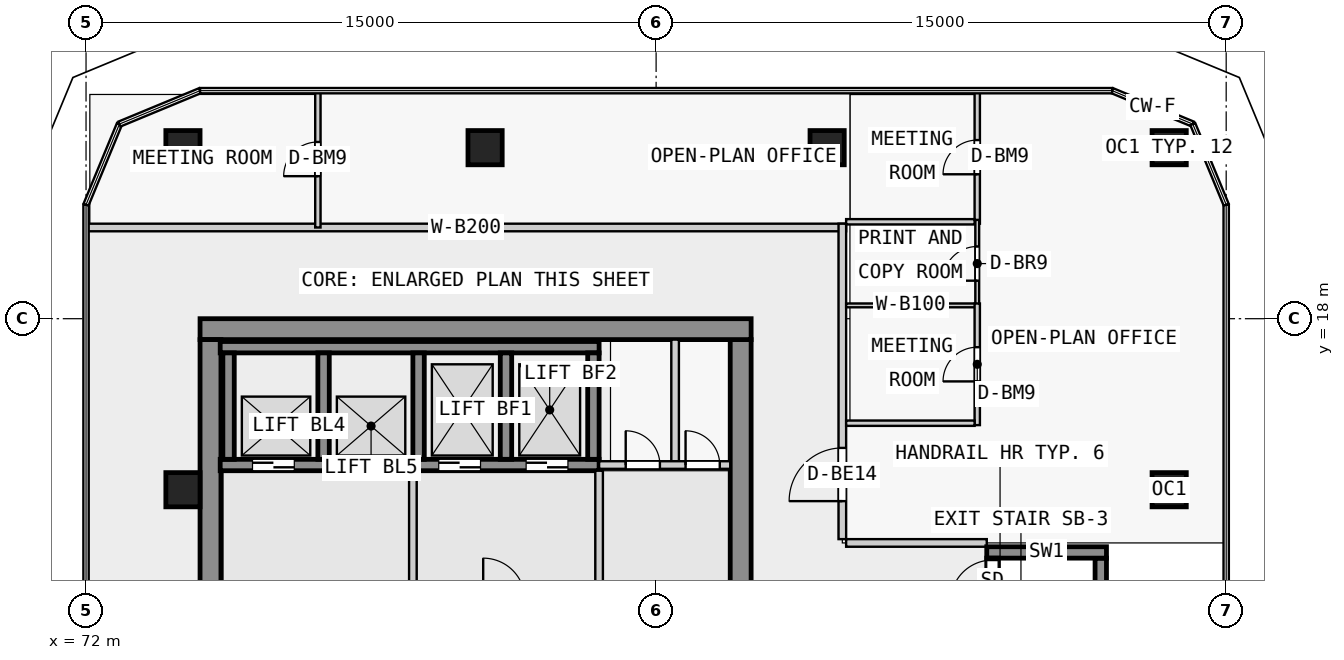
"""IFC4 building model, lengths in metres.
Left out: names, types, materials, properties, quantities, classifications, styles, units other than length and angle.
Written with IfcOpenShell. Run it as: python <this file> out.ifc"""

import sys

from ifc_helpers import new_model, si_unit, direction, frame, frame_2d, origin, origin_2d, place, context, subcontext, project, spatial, rectangle, extrude, element, fill, save


model = new_model("IFC4")
c1 = context("Model", 3, precision=1e-05, world=origin(), true_north=direction((0.0, 1.0)))
c2 = subcontext(c1, "Body", "Model", "MODEL_VIEW")
j1 = project(units=[si_unit("LENGTHUNIT", "METRE"), si_unit("PLANEANGLEUNIT", "RADIAN")], contexts=[c1])
p1 = place(None, origin())
s1 = spatial("IfcSite", under=j1, at=p1, CompositionType="ELEMENT")
p2 = place(p1, origin())
s2 = spatial("IfcBuilding", under=s1, at=p2, CompositionType="ELEMENT")
p3 = place(p2, frame((0.0, 0.0, 30.3)))
s3 = spatial("IfcBuildingStorey", under=s2, at=p3, CompositionType="ELEMENT", Elevation=30.3)
for number, where, z_axis, x_axis in (
    (1, (100.5, 13.5, 0.0), (0.0, 0.0, 1.0), (1.0, 0.0, 0.0)),
    (2, (100.5, 22.5, 0.0), (0.0, 0.0, 1.0), (1.0, 0.0, 0.0)),
    (3, (91.5, 22.5, 0.0), (0.0, 0.0, 1.0), (1.0, 0.0, 0.0)),
    (4, (82.5, 22.5, 0.0), (0.0, 0.0, 1.0), (1.0, 0.0, 0.0)),
    (5, (74.55, 22.5, 0.0), (0.0, 0.0, 1.0), (1.0, 0.0, 0.0)),
    (6, (74.55, 13.5, 0.0), (0.0, 0.0, 1.0), (1.0, 0.0, 0.0)),
):
    element("IfcColumn", number, at=place(p3, frame(where, z_axis=z_axis, x_axis=x_axis)), inside=s3, PredefinedType="COLUMN", context=c2, shape_type="SweptSolid", body=[
        extrude(rectangle(XDim=0.9, YDim=0.9, at=origin_2d()), origin(), (0.0, 0.0, 1.0), 3.5),
    ])
p4 = place(p3, frame((75.0, 17.725, 0.0), z_axis=(0.0, 0.0, 1.0), x_axis=(1.0, 0.0, 0.0)))
e7 = element("IfcWall", 7, at=p4, inside=s3, PredefinedType="SHEAR", context=c2, shape_type="SweptSolid", body=[
    extrude(rectangle(XDim=14.5, YDim=0.55, at=frame_2d((7.25, 0.0))), origin(), (0.0, 0.0, 1.0), 3.25),
])
p5 = place(p3, frame((75.275, 0.55, 0.0), z_axis=(0.0, 0.0, 1.0), x_axis=(0.0, 1.0, 0.0)))
e8 = element("IfcWall", 8, at=p5, inside=s3, PredefinedType="SHEAR", context=c2, shape_type="SweptSolid", body=[
    extrude(rectangle(XDim=16.9, YDim=0.55, at=frame_2d((8.45, 0.0))), origin(), (0.0, 0.0, 1.0), 3.25),
])
p6 = place(p5, frame((7.825, 0.0, 0.0)))
e9 = element("IfcOpeningElement", 9, at=p6, cuts=e8, PredefinedType="OPENING", context=c2, shape_type="SweptSolid", body=[
    extrude(rectangle(XDim=1.8, YDim=2.1, at=frame_2d((0.9, 1.05))), frame((0.0, 0.285, 0.0), z_axis=(0.0, -1.0, 0.0), x_axis=(1.0, 0.0, 0.0)), (0.0, 0.0, 1.0), 0.57),
])
p7 = place(p3, frame((89.225, 0.55, 0.0), z_axis=(0.0, 0.0, 1.0), x_axis=(0.0, 1.0, 0.0)))
e10 = element("IfcWall", 10, at=p7, inside=s3, PredefinedType="SHEAR", context=c2, shape_type="SweptSolid", body=[
    extrude(rectangle(XDim=16.9, YDim=0.55, at=frame_2d((8.45, 0.0))), origin(), (0.0, 0.0, 1.0), 3.25),
])
p8 = place(p7, frame((7.55, 0.0, 0.0)))
e11 = element("IfcOpeningElement", 11, at=p8, cuts=e10, PredefinedType="OPENING", context=c2, shape_type="SweptSolid", body=[
    extrude(rectangle(XDim=1.8, YDim=2.1, at=frame_2d((0.9, 1.05))), frame((0.0, 0.285, 0.0), z_axis=(0.0, -1.0, 0.0), x_axis=(1.0, 0.0, 0.0)), (0.0, 0.0, 1.0), 0.57),
])
p9 = place(p3, frame((75.53, 17.25, 0.0), z_axis=(0.0, 0.0, 1.0), x_axis=(1.0, 0.0, 0.0)))
e12 = element("IfcWall", 12, at=p9, inside=s3, PredefinedType="SHEAR", context=c2, shape_type="SweptSolid", body=[
    extrude(rectangle(XDim=9.97, YDim=0.3, at=frame_2d((4.985, 0.0))), origin(), (0.0, 0.0, 1.0), 3.25),
])
p10 = place(p3, frame((75.53, 14.15, 0.0), z_axis=(0.0, 0.0, 1.0), x_axis=(1.0, 0.0, 0.0)))
e13 = element("IfcWall", 13, at=p10, inside=s3, PredefinedType="SHEAR", context=c2, shape_type="SweptSolid", body=[
    extrude(rectangle(XDim=9.97, YDim=0.3, at=frame_2d((4.985, 0.0))), origin(), (0.0, 0.0, 1.0), 3.25),
])
p11 = place(p10, frame((0.85, 0.0, 0.0)))
e14 = element("IfcOpeningElement", 14, at=p11, cuts=e13, PredefinedType="OPENING", context=c2, shape_type="SweptSolid", body=[
    extrude(rectangle(XDim=1.1, YDim=2.1, at=frame_2d((0.55, 1.05))), frame((0.0, 0.16, 0.0), z_axis=(0.0, -1.0, 0.0), x_axis=(1.0, 0.0, 0.0)), (0.0, 0.0, 1.0), 0.32),
])
p12 = place(p10, frame((3.35, 0.0, 0.0)))
e15 = element("IfcOpeningElement", 15, at=p12, cuts=e13, PredefinedType="OPENING", context=c2, shape_type="SweptSolid", body=[
    extrude(rectangle(XDim=1.1, YDim=2.1, at=frame_2d((0.55, 1.05))), frame((0.0, 0.16, 0.0), z_axis=(0.0, -1.0, 0.0), x_axis=(1.0, 0.0, 0.0)), (0.0, 0.0, 1.0), 0.32),
])
p13 = place(p10, frame((5.75, 0.0, 0.0)))
e16 = element("IfcOpeningElement", 16, at=p13, cuts=e13, PredefinedType="OPENING", context=c2, shape_type="SweptSolid", body=[
    extrude(rectangle(XDim=1.1, YDim=2.1, at=frame_2d((0.55, 1.05))), frame((0.0, 0.16, 0.0), z_axis=(0.0, -1.0, 0.0), x_axis=(1.0, 0.0, 0.0)), (0.0, 0.0, 1.0), 0.32),
])
p14 = place(p10, frame((8.05, 0.0, 0.0)))
e17 = element("IfcOpeningElement", 17, at=p14, cuts=e13, PredefinedType="OPENING", context=c2, shape_type="SweptSolid", body=[
    extrude(rectangle(XDim=1.1, YDim=2.1, at=frame_2d((0.55, 1.05))), frame((0.0, 0.16, 0.0), z_axis=(0.0, -1.0, 0.0), x_axis=(1.0, 0.0, 0.0)), (0.0, 0.0, 1.0), 0.32),
])
for number, where, z_axis, x_axis in (
    (18, (75.75, 14.3, 0.0), (0.0, 0.0, 1.0), (0.0, 1.0, 0.0)),
    (19, (78.25, 14.3, 0.0), (0.0, 0.0, 1.0), (0.0, 1.0, 0.0)),
    (20, (80.75, 14.3, 0.0), (0.0, 0.0, 1.0), (0.0, 1.0, 0.0)),
    (21, (83.05, 14.3, 0.0), (0.0, 0.0, 1.0), (0.0, 1.0, 0.0)),
    (22, (85.35, 14.3, 0.0), (0.0, 0.0, 1.0), (0.0, 1.0, 0.0)),
):
    element("IfcWall", number, at=place(p3, frame(where, z_axis=z_axis, x_axis=x_axis)), inside=s3, PredefinedType="SHEAR", context=c2, shape_type="SweptSolid", body=[
        extrude(rectangle(XDim=2.8, YDim=0.3, at=frame_2d((1.4, 0.0))), origin(), (0.0, 0.0, 1.0), 3.25),
    ])
p15 = place(p3, frame((95.85, 5.3, 0.0), z_axis=(0.0, 0.0, 1.0), x_axis=(0.0, 1.0, 0.0)))
e23 = element("IfcWall", 23, at=p15, inside=s3, PredefinedType="SHEAR", context=c2, shape_type="SweptSolid", body=[
    extrude(rectangle(XDim=6.4, YDim=0.3, at=frame_2d((3.2, 0.0))), origin(), (0.0, 0.0, 1.0), 3.25),
])
p16 = place(p15, frame((5.25, 0.0, 0.0)))
e24 = element("IfcOpeningElement", 24, at=p16, cuts=e23, PredefinedType="OPENING", context=c2, shape_type="SweptSolid", body=[
    extrude(rectangle(XDim=1.1, YDim=2.1, at=frame_2d((0.55, 1.05))), frame((0.0, 0.16, 0.0), z_axis=(0.0, -1.0, 0.0), x_axis=(1.0, 0.0, 0.0)), (0.0, 0.0, 1.0), 0.32),
])
p17 = place(p3, frame((98.7, 5.3, 0.0), z_axis=(0.0, 0.0, 1.0), x_axis=(0.0, 1.0, 0.0)))
e25 = element("IfcWall", 25, at=p17, inside=s3, PredefinedType="SHEAR", context=c2, shape_type="SweptSolid", body=[
    extrude(rectangle(XDim=6.4, YDim=0.3, at=frame_2d((3.2, 0.0))), origin(), (0.0, 0.0, 1.0), 3.25),
])
p18 = place(p3, frame((95.7, 11.85, 0.0), z_axis=(0.0, 0.0, 1.0), x_axis=(1.0, 0.0, 0.0)))
e26 = element("IfcWall", 26, at=p18, inside=s3, PredefinedType="SHEAR", context=c2, shape_type="SweptSolid", body=[
    extrude(rectangle(XDim=3.15, YDim=0.3, at=frame_2d((1.575, 0.0))), origin(), (0.0, 0.0, 1.0), 3.25),
])
for number, where, z_axis, x_axis in (
    (27, (80.6, 10.6, 0.0), (0.0, 0.0, 1.0), (0.0, 1.0, 0.0)),
    (28, (85.5, 10.6, 0.0), (0.0, 0.0, 1.0), (0.0, 1.0, 0.0)),
):
    element("IfcWall", number, at=place(p3, frame(where, z_axis=z_axis, x_axis=x_axis)), inside=s3, PredefinedType="PARTITIONING", context=c2, shape_type="SweptSolid", body=[
        extrude(rectangle(XDim=3.4, YDim=0.2, at=frame_2d((1.7, 0.0))), origin(), (0.0, 0.0, 1.0), 3.25),
    ])
p19 = place(p3, frame((85.5, 14.15, 0.0), z_axis=(0.0, 0.0, 1.0), x_axis=(1.0, 0.0, 0.0)))
e29 = element("IfcWall", 29, at=p19, inside=s3, PredefinedType="PARTITIONING", context=c2, shape_type="SweptSolid", body=[
    extrude(rectangle(XDim=3.45, YDim=0.2, at=frame_2d((1.725, 0.0))), origin(), (0.0, 0.0, 1.0), 3.25),
])
p20 = place(p19, frame((0.7, 0.0, 0.0)))
e30 = element("IfcOpeningElement", 30, at=p20, cuts=e29, PredefinedType="OPENING", context=c2, shape_type="SweptSolid", body=[
    extrude(rectangle(XDim=0.9, YDim=2.1, at=frame_2d((0.45, 1.05))), frame((0.0, 0.11, 0.0), z_axis=(0.0, -1.0, 0.0), x_axis=(1.0, 0.0, 0.0)), (0.0, 0.0, 1.0), 0.22),
])
p21 = place(p19, frame((2.275, 0.0, 0.0)))
e31 = element("IfcOpeningElement", 31, at=p21, cuts=e29, PredefinedType="OPENING", context=c2, shape_type="SweptSolid", body=[
    extrude(rectangle(XDim=0.9, YDim=2.1, at=frame_2d((0.45, 1.05))), frame((0.0, 0.11, 0.0), z_axis=(0.0, -1.0, 0.0), x_axis=(1.0, 0.0, 0.0)), (0.0, 0.0, 1.0), 0.22),
])
p22 = place(p3, frame((87.5, 14.25, 0.0), z_axis=(0.0, 0.0, 1.0), x_axis=(0.0, 1.0, 0.0)))
e32 = element("IfcWall", 32, at=p22, inside=s3, PredefinedType="PARTITIONING", context=c2, shape_type="SweptSolid", body=[
    extrude(rectangle(XDim=3.2, YDim=0.2, at=frame_2d((1.6, 0.0))), origin(), (0.0, 0.0, 1.0), 3.25),
])
p23 = place(p3, frame((72.0, 20.4, 0.0), z_axis=(0.0, 0.0, 1.0), x_axis=(1.0, 0.0, 0.0)))
e33 = element("IfcWall", 33, at=p23, inside=s3, PredefinedType="PARTITIONING", context=c2, shape_type="SweptSolid", body=[
    extrude(rectangle(XDim=20.0, YDim=0.2, at=frame_2d((10.0, 0.0))), origin(), (0.0, 0.0, 1.0), 3.25),
])
p24 = place(p3, frame((91.9, 12.2, 0.0), z_axis=(0.0, 0.0, 1.0), x_axis=(0.0, 1.0, 0.0)))
e34 = element("IfcWall", 34, at=p24, inside=s3, PredefinedType="PARTITIONING", context=c2, shape_type="SweptSolid", body=[
    extrude(rectangle(XDim=8.3, YDim=0.2, at=frame_2d((4.15, 0.0))), origin(), (0.0, 0.0, 1.0), 3.25),
])
p25 = place(p24, frame((1.0, 0.0, 0.0)))
e35 = element("IfcOpeningElement", 35, at=p25, cuts=e34, PredefinedType="OPENING", context=c2, shape_type="SweptSolid", body=[
    extrude(rectangle(XDim=1.4, YDim=2.4, at=frame_2d((0.7, 1.2))), frame((0.0, 0.11, 0.0), z_axis=(0.0, -1.0, 0.0), x_axis=(1.0, 0.0, 0.0)), (0.0, 0.0, 1.0), 0.22),
])
p26 = place(p3, frame((92.0, 12.1, 0.0), z_axis=(0.0, 0.0, 1.0), x_axis=(1.0, 0.0, 0.0)))
e36 = element("IfcWall", 36, at=p26, inside=s3, PredefinedType="PARTITIONING", context=c2, shape_type="SweptSolid", body=[
    extrude(rectangle(XDim=3.7, YDim=0.2, at=frame_2d((1.85, 0.0))), origin(), (0.0, 0.0, 1.0), 3.25),
])
p27 = place(p3, frame((95.45, 20.5, 0.0), z_axis=(0.0, 0.0, 1.0), x_axis=(0.0, 1.0, 0.0)))
e37 = element("IfcWall", 37, at=p27, inside=s3, PredefinedType="PARTITIONING", context=c2, shape_type="SweptSolid", body=[
    extrude(rectangle(XDim=3.5, YDim=0.14, at=frame_2d((1.75, 0.0))), origin(), (0.0, 0.0, 1.0), 3.25),
])
p28 = place(p27, frame((1.3, 0.0, 0.0)))
e38 = element("IfcOpeningElement", 38, at=p28, cuts=e37, PredefinedType="OPENING", context=c2, shape_type="SweptSolid", body=[
    extrude(rectangle(XDim=0.9, YDim=2.4, at=frame_2d((0.45, 1.2))), frame((0.0, 0.08, 0.0), z_axis=(0.0, -1.0, 0.0), x_axis=(1.0, 0.0, 0.0)), (0.0, 0.0, 1.0), 0.16),
])
p29 = place(p3, frame((92.0, 20.55, 0.0), z_axis=(0.0, 0.0, 1.0), x_axis=(1.0, 0.0, 0.0)))
e39 = element("IfcWall", 39, at=p29, inside=s3, PredefinedType="PARTITIONING", context=c2, shape_type="SweptSolid", body=[
    extrude(rectangle(XDim=3.38, YDim=0.14, at=frame_2d((1.69, 0.0))), origin(), (0.0, 0.0, 1.0), 3.25),
])
p30 = place(p3, frame((95.45, 18.3, 0.0), z_axis=(0.0, 0.0, 1.0), x_axis=(0.0, 1.0, 0.0)))
e40 = element("IfcWall", 40, at=p30, inside=s3, PredefinedType="PARTITIONING", context=c2, shape_type="SweptSolid", body=[
    extrude(rectangle(XDim=2.3, YDim=0.1, at=frame_2d((1.15, 0.0))), origin(), (0.0, 0.0, 1.0), 3.25),
])
p31 = place(p30, frame((0.7, 0.0, 0.0)))
e41 = element("IfcOpeningElement", 41, at=p31, cuts=e40, PredefinedType="OPENING", context=c2, shape_type="SweptSolid", body=[
    extrude(rectangle(XDim=0.9, YDim=2.1, at=frame_2d((0.45, 1.05))), frame((0.0, 0.06, 0.0), z_axis=(0.0, -1.0, 0.0), x_axis=(1.0, 0.0, 0.0)), (0.0, 0.0, 1.0), 0.12),
])
p32 = place(p3, frame((92.0, 18.35, 0.0), z_axis=(0.0, 0.0, 1.0), x_axis=(1.0, 0.0, 0.0)))
e42 = element("IfcWall", 42, at=p32, inside=s3, PredefinedType="PARTITIONING", context=c2, shape_type="SweptSolid", body=[
    extrude(rectangle(XDim=3.4, YDim=0.1, at=frame_2d((1.7, 0.0))), origin(), (0.0, 0.0, 1.0), 3.25),
])
p33 = place(p3, frame((95.45, 15.2, 0.0), z_axis=(0.0, 0.0, 1.0), x_axis=(0.0, 1.0, 0.0)))
e43 = element("IfcWall", 43, at=p33, inside=s3, PredefinedType="PARTITIONING", context=c2, shape_type="SweptSolid", body=[
    extrude(rectangle(XDim=3.2, YDim=0.14, at=frame_2d((1.6, 0.0))), origin(), (0.0, 0.0, 1.0), 3.25),
])
p34 = place(p33, frame((1.15, 0.0, 0.0)))
e44 = element("IfcOpeningElement", 44, at=p34, cuts=e43, PredefinedType="OPENING", context=c2, shape_type="SweptSolid", body=[
    extrude(rectangle(XDim=0.9, YDim=2.4, at=frame_2d((0.45, 1.2))), frame((0.0, 0.08, 0.0), z_axis=(0.0, -1.0, 0.0), x_axis=(1.0, 0.0, 0.0)), (0.0, 0.0, 1.0), 0.16),
])
p35 = place(p3, frame((92.0, 15.25, 0.0), z_axis=(0.0, 0.0, 1.0), x_axis=(1.0, 0.0, 0.0)))
e45 = element("IfcWall", 45, at=p35, inside=s3, PredefinedType="PARTITIONING", context=c2, shape_type="SweptSolid", body=[
    extrude(rectangle(XDim=3.38, YDim=0.14, at=frame_2d((1.69, 0.0))), origin(), (0.0, 0.0, 1.0), 3.25),
])
p36 = place(p3, frame((78.1, 20.4, 0.0), z_axis=(0.0, 0.0, 1.0), x_axis=(0.0, 1.0, 0.0)))
e46 = element("IfcWall", 46, at=p36, inside=s3, PredefinedType="PARTITIONING", context=c2, shape_type="SweptSolid", body=[
    extrude(rectangle(XDim=3.6, YDim=0.14, at=frame_2d((1.8, 0.0))), origin(), (0.0, 0.0, 1.0), 3.25),
])
p37 = place(p36, frame((1.35, 0.0, 0.0)))
e47 = element("IfcOpeningElement", 47, at=p37, cuts=e46, PredefinedType="OPENING", context=c2, shape_type="SweptSolid", body=[
    extrude(rectangle(XDim=0.9, YDim=2.4, at=frame_2d((0.45, 1.2))), frame((0.0, 0.08, 0.0), z_axis=(0.0, -1.0, 0.0), x_axis=(1.0, 0.0, 0.0)), (0.0, 0.0, 1.0), 0.16),
])
p38 = place(p11, origin())
e48 = element("IfcDoor", 48, at=p38, inside=s3, OperationType="DOUBLE_DOOR_SLIDING", PredefinedType="DOOR", context=c2, shape_type="SweptSolid", body=[
    extrude(rectangle(XDim=1.1, YDim=2.1, at=frame_2d((0.55, 1.05))), frame((0.0, 0.025, 0.0), z_axis=(0.0, -1.0, 0.0), x_axis=(1.0, 0.0, 0.0)), (0.0, 0.0, 1.0), 0.05),
])
fill(e14, e48)
p39 = place(p12, origin())
e49 = element("IfcDoor", 49, at=p39, inside=s3, OperationType="DOUBLE_DOOR_SLIDING", PredefinedType="DOOR", context=c2, shape_type="SweptSolid", body=[
    extrude(rectangle(XDim=1.1, YDim=2.1, at=frame_2d((0.55, 1.05))), frame((0.0, 0.025, 0.0), z_axis=(0.0, -1.0, 0.0), x_axis=(1.0, 0.0, 0.0)), (0.0, 0.0, 1.0), 0.05),
])
fill(e15, e49)
p40 = place(p13, origin())
e50 = element("IfcDoor", 50, at=p40, inside=s3, OperationType="DOUBLE_DOOR_SLIDING", PredefinedType="DOOR", context=c2, shape_type="SweptSolid", body=[
    extrude(rectangle(XDim=1.1, YDim=2.1, at=frame_2d((0.55, 1.05))), frame((0.0, 0.025, 0.0), z_axis=(0.0, -1.0, 0.0), x_axis=(1.0, 0.0, 0.0)), (0.0, 0.0, 1.0), 0.05),
])
fill(e16, e50)
p41 = place(p14, origin())
e51 = element("IfcDoor", 51, at=p41, inside=s3, OperationType="DOUBLE_DOOR_SLIDING", PredefinedType="DOOR", context=c2, shape_type="SweptSolid", body=[
    extrude(rectangle(XDim=1.1, YDim=2.1, at=frame_2d((0.55, 1.05))), frame((0.0, 0.025, 0.0), z_axis=(0.0, -1.0, 0.0), x_axis=(1.0, 0.0, 0.0)), (0.0, 0.0, 1.0), 0.05),
])
fill(e17, e51)
p42 = place(p16, origin())
e52 = element("IfcDoor", 52, at=p42, inside=s3, OperationType="SINGLE_SWING_LEFT", PredefinedType="DOOR", context=c2, shape_type="SweptSolid", body=[
    extrude(rectangle(XDim=1.1, YDim=2.1, at=frame_2d((0.55, 1.05))), frame((0.0, 0.025, 0.0), z_axis=(0.0, -1.0, 0.0), x_axis=(1.0, 0.0, 0.0)), (0.0, 0.0, 1.0), 0.05),
])
fill(e24, e52)
p43 = place(p20, origin())
e53 = element("IfcDoor", 53, at=p43, inside=s3, OperationType="SINGLE_SWING_LEFT", PredefinedType="DOOR", context=c2, shape_type="SweptSolid", body=[
    extrude(rectangle(XDim=0.9, YDim=2.1, at=frame_2d((0.45, 1.05))), frame((0.0, 0.025, 0.0), z_axis=(0.0, -1.0, 0.0), x_axis=(1.0, 0.0, 0.0)), (0.0, 0.0, 1.0), 0.05),
])
fill(e30, e53)
p44 = place(p21, origin())
e54 = element("IfcDoor", 54, at=p44, inside=s3, OperationType="SINGLE_SWING_LEFT", PredefinedType="DOOR", context=c2, shape_type="SweptSolid", body=[
    extrude(rectangle(XDim=0.9, YDim=2.1, at=frame_2d((0.45, 1.05))), frame((0.0, 0.025, 0.0), z_axis=(0.0, -1.0, 0.0), x_axis=(1.0, 0.0, 0.0)), (0.0, 0.0, 1.0), 0.05),
])
fill(e31, e54)
p45 = place(p25, origin())
e55 = element("IfcDoor", 55, at=p45, inside=s3, OperationType="DOUBLE_DOOR_SINGLE_SWING", PredefinedType="DOOR", context=c2, shape_type="SweptSolid", body=[
    extrude(rectangle(XDim=1.4, YDim=2.4, at=frame_2d((0.7, 1.2))), frame((0.0, 0.025, 0.0), z_axis=(0.0, -1.0, 0.0), x_axis=(1.0, 0.0, 0.0)), (0.0, 0.0, 1.0), 0.05),
])
fill(e35, e55)
p46 = place(p28, origin())
e56 = element("IfcDoor", 56, at=p46, inside=s3, OperationType="SINGLE_SWING_LEFT", PredefinedType="DOOR", context=c2, shape_type="SweptSolid", body=[
    extrude(rectangle(XDim=0.9, YDim=2.4, at=frame_2d((0.45, 1.2))), frame((0.0, 0.025, 0.0), z_axis=(0.0, -1.0, 0.0), x_axis=(1.0, 0.0, 0.0)), (0.0, 0.0, 1.0), 0.05),
])
fill(e38, e56)
p47 = place(p31, origin())
e57 = element("IfcDoor", 57, at=p47, inside=s3, OperationType="SINGLE_SWING_LEFT", PredefinedType="DOOR", context=c2, shape_type="SweptSolid", body=[
    extrude(rectangle(XDim=0.9, YDim=2.1, at=frame_2d((0.45, 1.05))), frame((0.0, 0.025, 0.0), z_axis=(0.0, -1.0, 0.0), x_axis=(1.0, 0.0, 0.0)), (0.0, 0.0, 1.0), 0.05),
])
fill(e41, e57)
p48 = place(p34, origin())
e58 = element("IfcDoor", 58, at=p48, inside=s3, OperationType="SINGLE_SWING_LEFT", PredefinedType="DOOR", context=c2, shape_type="SweptSolid", body=[
    extrude(rectangle(XDim=0.9, YDim=2.4, at=frame_2d((0.45, 1.2))), frame((0.0, 0.025, 0.0), z_axis=(0.0, -1.0, 0.0), x_axis=(1.0, 0.0, 0.0)), (0.0, 0.0, 1.0), 0.05),
])
fill(e44, e58)
p49 = place(p37, origin())
e59 = element("IfcDoor", 59, at=p49, inside=s3, OperationType="SINGLE_SWING_LEFT", PredefinedType="DOOR", context=c2, shape_type="SweptSolid", body=[
    extrude(rectangle(XDim=0.9, YDim=2.4, at=frame_2d((0.45, 1.2))), frame((0.0, 0.025, 0.0), z_axis=(0.0, -1.0, 0.0), x_axis=(1.0, 0.0, 0.0)), (0.0, 0.0, 1.0), 0.05),
])
fill(e47, e59)
save(model, sys.argv[1])
